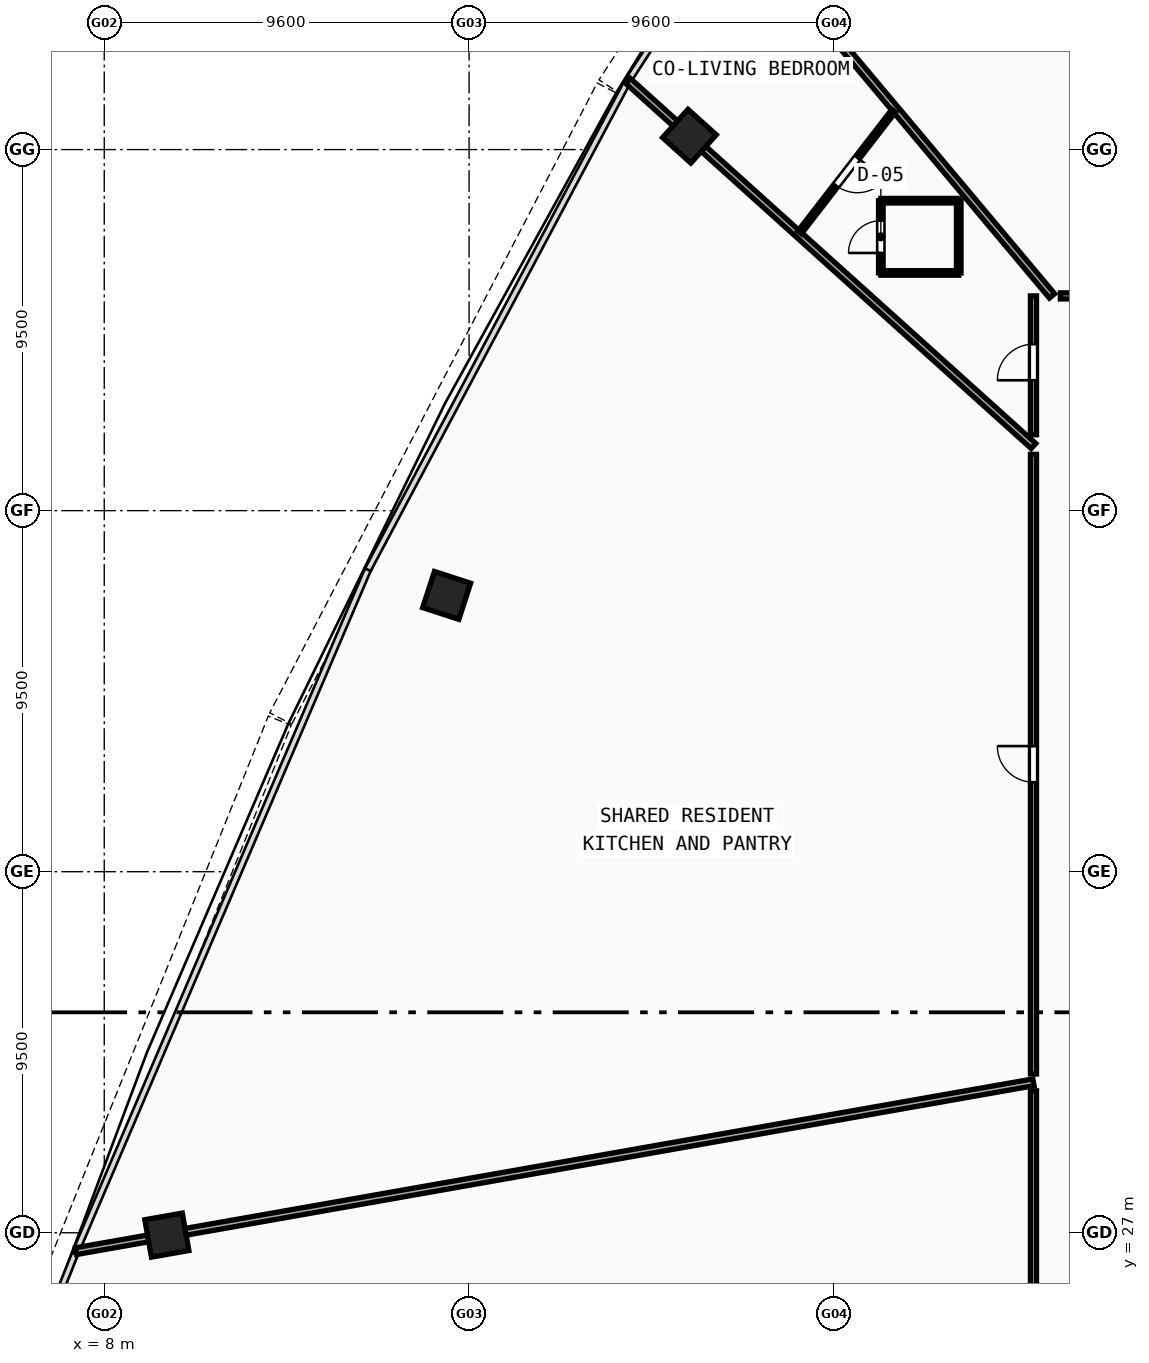
"""IFC4 building model, lengths in metres.
Left out: names, types, materials, properties, quantities, classifications, styles, units other than length and angle.
Written with IfcOpenShell. Run it as: python <this file> out.ifc"""

import sys

from ifc_helpers import new_model, si_unit, direction, frame, frame_2d, origin, origin_with_axes, origin_2d, place, context, subcontext, project, spatial, rectangle, hollow_rectangle, extrude, source, transform, mapped, element, fill, save


model = new_model("IFC4")
c1 = context("Model", 3, precision=1e-05, world=origin(), true_north=direction((0.0, 1.0)))
c2 = subcontext(c1, "Body", "Model", "MODEL_VIEW")
j1 = project(units=[si_unit("LENGTHUNIT", "METRE"), si_unit("PLANEANGLEUNIT", "RADIAN")], contexts=[c1])
p1 = place(None, origin())
s1 = spatial("IfcSite", under=j1, at=p1, CompositionType="ELEMENT")
p2 = place(p1, origin())
s2 = spatial("IfcBuilding", under=s1, at=p2, CompositionType="ELEMENT")
p3 = place(p2, frame((0.0, 0.0, 88.78)))
s3 = spatial("IfcBuildingStorey", under=s2, at=p3, CompositionType="ELEMENT", Elevation=88.78)
m1 = source(origin(), c2, "Body", "SweptSolid", [
    extrude(hollow_rectangle(XDim=1.0, YDim=1.0, WallThickness=0.042, at=origin_2d()), origin(), (0.0, 0.0, 1.0), 3.8),
])
for number, where, z_axis, x_axis in (
    (1, (23.397, 55.852, -0.26), (0.0, 0.0, 1.0), (-0.669, -0.743, 0.0)),
    (2, (17.009, 43.77, -0.26), (0.0, 0.0, 1.0), (-0.309, -0.951, 0.0)),
    (3, (9.647, 26.938, -0.26), (0.0, 0.0, 1.0), (0.174, -0.985, 0.0)),
):
    element("IfcColumn", number, at=place(p3, frame(where, z_axis=z_axis, x_axis=x_axis)), inside=s3, PredefinedType="COLUMN", context=c2, shape_type="MappedRepresentation", body=[
        mapped(m1, transform((0.0, 0.0, 0.0), scale=1.0)),
    ])
p4 = place(p3, frame((40.008, 51.65, 0.0), z_axis=(0.0, 0.0, 1.0), x_axis=(-0.406733854264, 0.913546699296, 0.0)))
e4 = element("IfcWall", 4, at=p4, inside=s3, PredefinedType="PARTITIONING", context=c2, shape_type="SweptSolid", body=[
    extrude(rectangle(XDim=21.911, YDim=0.18, at=frame_2d((10.956, 0.0))), origin(), (0.0, 0.0, 1.0), 2.84),
])
p5 = place(p3, frame((32.938, 51.65, 0.0), z_axis=(0.0, 0.0, 1.0), x_axis=(-0.642792408097, 0.766040416749, 0.0)))
e5 = element("IfcWall", 5, at=p5, inside=s3, PredefinedType="PARTITIONING", context=c2, shape_type="SweptSolid", body=[
    extrude(rectangle(XDim=13.01, YDim=0.18, at=frame_2d((6.505, 0.0))), origin(), (0.0, 0.0, 1.0), 2.84),
])
p6 = place(p3, frame((32.45, 47.701, 0.0), z_axis=(0.0, 0.0, 1.0), x_axis=(-0.743147852162, 0.66912724487, 0.0)))
e6 = element("IfcWall", 6, at=p6, inside=s3, PredefinedType="PARTITIONING", context=c2, shape_type="SweptSolid", body=[
    extrude(rectangle(XDim=14.357, YDim=0.18, at=frame_2d((7.179, 0.0))), origin(), (0.0, 0.0, 1.0), 2.84),
])
p7 = place(p3, frame((32.45, 30.958, 0.0), z_axis=(0.0, 0.0, 1.0), x_axis=(-0.984808048641, -0.173646501066, 0.0)))
e7 = element("IfcWall", 7, at=p7, inside=s3, PredefinedType="PARTITIONING", context=c2, shape_type="SweptSolid", body=[
    extrude(rectangle(XDim=25.582, YDim=0.18, at=frame_2d((12.791, 0.0))), origin(), (0.0, 0.0, 1.0), 2.84),
])
p8 = place(p3, frame((32.45, 24.8, 0.0), z_axis=(0.0, 0.0, 1.0), x_axis=(0.0, 1.0, 0.0)))
e8 = element("IfcWall", 8, at=p8, inside=s3, PredefinedType="PARTITIONING", context=c2, shape_type="SweptSolid", body=[
    extrude(rectangle(XDim=5.935, YDim=0.16, at=frame_2d((2.967, 0.0))), origin(), (0.0, 0.0, 1.0), 3.14),
])
p9 = place(p3, frame((32.45, 31.178, 0.0), z_axis=(0.0, 0.0, 1.0), x_axis=(0.0, 1.0, 0.0)))
e9 = element("IfcWall", 9, at=p9, inside=s3, PredefinedType="PARTITIONING", context=c2, shape_type="SweptSolid", body=[
    extrude(rectangle(XDim=16.304, YDim=0.16, at=frame_2d((8.152, 0.0))), origin(), (0.0, 0.0, 1.0), 2.84),
])
p10 = place(p9, frame((7.677, 0.0, 0.0)))
e10 = element("IfcOpeningElement", 10, at=p10, cuts=e9, PredefinedType="OPENING", context=c2, shape_type="SweptSolid", body=[
    extrude(rectangle(XDim=0.95, YDim=2.1, at=frame_2d((0.475, 1.05))), frame((0.0, 0.09, 0.0), z_axis=(0.0, -1.0, 0.0), x_axis=(1.0, 0.0, 0.0)), (0.0, 0.0, 1.0), 0.18),
])
p11 = place(p3, frame((32.45, 47.997, 0.0), z_axis=(0.0, 0.0, 1.0), x_axis=(0.0, 1.0, 0.0)))
e11 = element("IfcWall", 11, at=p11, inside=s3, PredefinedType="PARTITIONING", context=c2, shape_type="SweptSolid", body=[
    extrude(rectangle(XDim=3.653, YDim=0.16, at=frame_2d((1.826, 0.0))), origin(), (0.0, 0.0, 1.0), 3.54),
])
p12 = place(p11, frame((1.433, 0.0, 0.0)))
e12 = element("IfcOpeningElement", 12, at=p12, cuts=e11, PredefinedType="OPENING", context=c2, shape_type="SweptSolid", body=[
    extrude(rectangle(XDim=0.95, YDim=2.1, at=frame_2d((0.475, 1.05))), frame((0.0, 0.09, 0.0), z_axis=(0.0, -1.0, 0.0), x_axis=(1.0, 0.0, 0.0)), (0.0, 0.0, 1.0), 0.18),
])
p13 = place(p3, frame((33.158, 51.65, 0.0), z_axis=(0.0, 0.0, 1.0), x_axis=(1.0, 0.0, 0.0)))
e13 = element("IfcWall", 13, at=p13, inside=s3, PredefinedType="PARTITIONING", context=c2, shape_type="SweptSolid", body=[
    extrude(rectangle(XDim=6.609, YDim=0.16, at=frame_2d((3.305, 0.0))), origin(), (0.0, 0.0, 1.0), 3.54),
])
p14 = place(p13, frame((2.84, 0.0, 0.0)))
e14 = element("IfcOpeningElement", 14, at=p14, cuts=e13, PredefinedType="OPENING", context=c2, shape_type="SweptSolid", body=[
    extrude(rectangle(XDim=0.95, YDim=2.1, at=frame_2d((0.475, 1.05))), frame((0.0, 0.09, 0.0), z_axis=(0.0, -1.0, 0.0), x_axis=(1.0, 0.0, 0.0)), (0.0, 0.0, 1.0), 0.18),
])
p15 = place(p3, frame((28.434, 52.255, 0.0), z_axis=(0.0, 0.0, 1.0), x_axis=(1.0, 0.0, 0.0)))
e15 = element("IfcWall", 15, at=p15, inside=s3, PredefinedType="PARTITIONING", context=c2, shape_type="SweptSolid", body=[
    extrude(rectangle(XDim=2.05, YDim=0.12, at=frame_2d((1.025, 0.0))), origin(), (0.0, 0.0, 1.0), 3.14),
])
p16 = place(p3, frame((30.484, 52.255, 0.0), z_axis=(0.0, 0.0, 1.0), x_axis=(0.0, 1.0, 0.0)))
e16 = element("IfcWall", 16, at=p16, inside=s3, PredefinedType="PARTITIONING", context=c2, shape_type="SweptSolid", body=[
    extrude(rectangle(XDim=1.9, YDim=0.12, at=frame_2d((0.95, 0.0))), origin(), (0.0, 0.0, 1.0), 3.14),
])
p17 = place(p3, frame((30.484, 54.155, 0.0), z_axis=(0.0, 0.0, 1.0), x_axis=(-1.0, 0.0, 0.0)))
e17 = element("IfcWall", 17, at=p17, inside=s3, PredefinedType="PARTITIONING", context=c2, shape_type="SweptSolid", body=[
    extrude(rectangle(XDim=2.05, YDim=0.12, at=frame_2d((1.025, 0.0))), origin(), (0.0, 0.0, 1.0), 3.54),
])
p18 = place(p3, frame((28.434, 54.155, 0.0), z_axis=(0.0, 0.0, 1.0), x_axis=(0.0, -1.0, 0.0)))
e18 = element("IfcWall", 18, at=p18, inside=s3, PredefinedType="PARTITIONING", context=c2, shape_type="SweptSolid", body=[
    extrude(rectangle(XDim=1.9, YDim=0.12, at=frame_2d((0.95, 0.0))), origin(), (0.0, 0.0, 1.0), 3.54),
])
p19 = place(p18, frame((0.525, 0.0, 0.0)))
e19 = element("IfcOpeningElement", 19, at=p19, cuts=e18, PredefinedType="OPENING", context=c2, shape_type="SweptSolid", body=[
    extrude(rectangle(XDim=0.85, YDim=2.1, at=frame_2d((0.425, 1.05))), frame((0.0, 0.07, 0.0), z_axis=(0.0, -1.0, 0.0), x_axis=(1.0, 0.0, 0.0)), (0.0, 0.0, 1.0), 0.14),
])
p20 = place(p3, frame((28.772, 56.521, 0.0), z_axis=(0.0, 0.0, 1.0), x_axis=(-0.611610665825, -0.791158892669, 0.0)))
e20 = element("IfcWall", 20, at=p20, inside=s3, PredefinedType="PARTITIONING", context=c2, shape_type="SweptSolid", body=[
    extrude(rectangle(XDim=4.045, YDim=0.12, at=frame_2d((2.022, 0.0))), origin(), (0.0, 0.0, 1.0), 2.84),
])
p21 = place(p20, frame((1.562, 0.0, 0.0)))
e21 = element("IfcOpeningElement", 21, at=p21, cuts=e20, PredefinedType="OPENING", context=c2, shape_type="SweptSolid", body=[
    extrude(rectangle(XDim=0.92, YDim=2.1, at=frame_2d((0.46, 1.05))), frame((0.0, 0.07, 0.0), z_axis=(0.0, -1.0, 0.0), x_axis=(1.0, 0.0, 0.0)), (0.0, 0.0, 1.0), 0.14),
])
m2 = source(origin(), c2, "Body", "SweptSolid", [
    extrude(rectangle(XDim=0.95, YDim=2.1, at=frame_2d((0.475, 1.05))), frame((0.0, 0.025, 0.0), z_axis=(0.0, -1.0, 0.0), x_axis=(1.0, 0.0, 0.0)), (0.0, 0.0, 1.0), 0.05),
])
p22 = place(p12, origin_with_axes())
e22 = element("IfcDoor", 22, at=p22, inside=s3, OperationType="SINGLE_SWING_LEFT", PredefinedType="DOOR", context=c2, shape_type="MappedRepresentation", body=[
    mapped(m2, transform((0.0, 0.0, 0.0), scale=1.0)),
])
fill(e12, e22)
m3 = source(origin(), c2, "Body", "SweptSolid", [
    extrude(rectangle(XDim=0.85, YDim=2.1, at=frame_2d((0.425, 1.05))), frame((0.0, 0.025, 0.0), z_axis=(0.0, -1.0, 0.0), x_axis=(1.0, 0.0, 0.0)), (0.0, 0.0, 1.0), 0.05),
])
p23 = place(p19, frame((0.85, 0.0, 0.0), z_axis=(0.0, 0.0, 1.0), x_axis=(-1.0, 0.0, 0.0)))
e23 = element("IfcDoor", 23, at=p23, inside=s3, OperationType="SINGLE_SWING_LEFT", PredefinedType="DOOR", context=c2, shape_type="MappedRepresentation", body=[
    mapped(m3, transform((0.0, 0.0, 0.0), scale=1.0)),
])
fill(e19, e23)
m4 = source(origin(), c2, "Body", "SweptSolid", [
    extrude(rectangle(XDim=0.92, YDim=2.1, at=frame_2d((0.46, 1.05))), frame((0.0, 0.025, 0.0), z_axis=(0.0, -1.0, 0.0), x_axis=(1.0, 0.0, 0.0)), (0.0, 0.0, 1.0), 0.05),
])
p24 = place(p21, origin_with_axes())
e24 = element("IfcDoor", 24, at=p24, inside=s3, OperationType="SINGLE_SWING_LEFT", PredefinedType="DOOR", context=c2, shape_type="MappedRepresentation", body=[
    mapped(m4, transform((0.0, 0.0, 0.0), scale=1.0)),
])
fill(e21, e24)
p25 = place(p10, origin_with_axes())
e25 = element("IfcDoor", 25, at=p25, inside=s3, OperationType="SINGLE_SWING_RIGHT", PredefinedType="DOOR", context=c2, shape_type="MappedRepresentation", body=[
    mapped(m2, transform((0.0, 0.0, 0.0), scale=1.0)),
])
fill(e10, e25)
save(model, sys.argv[1])
